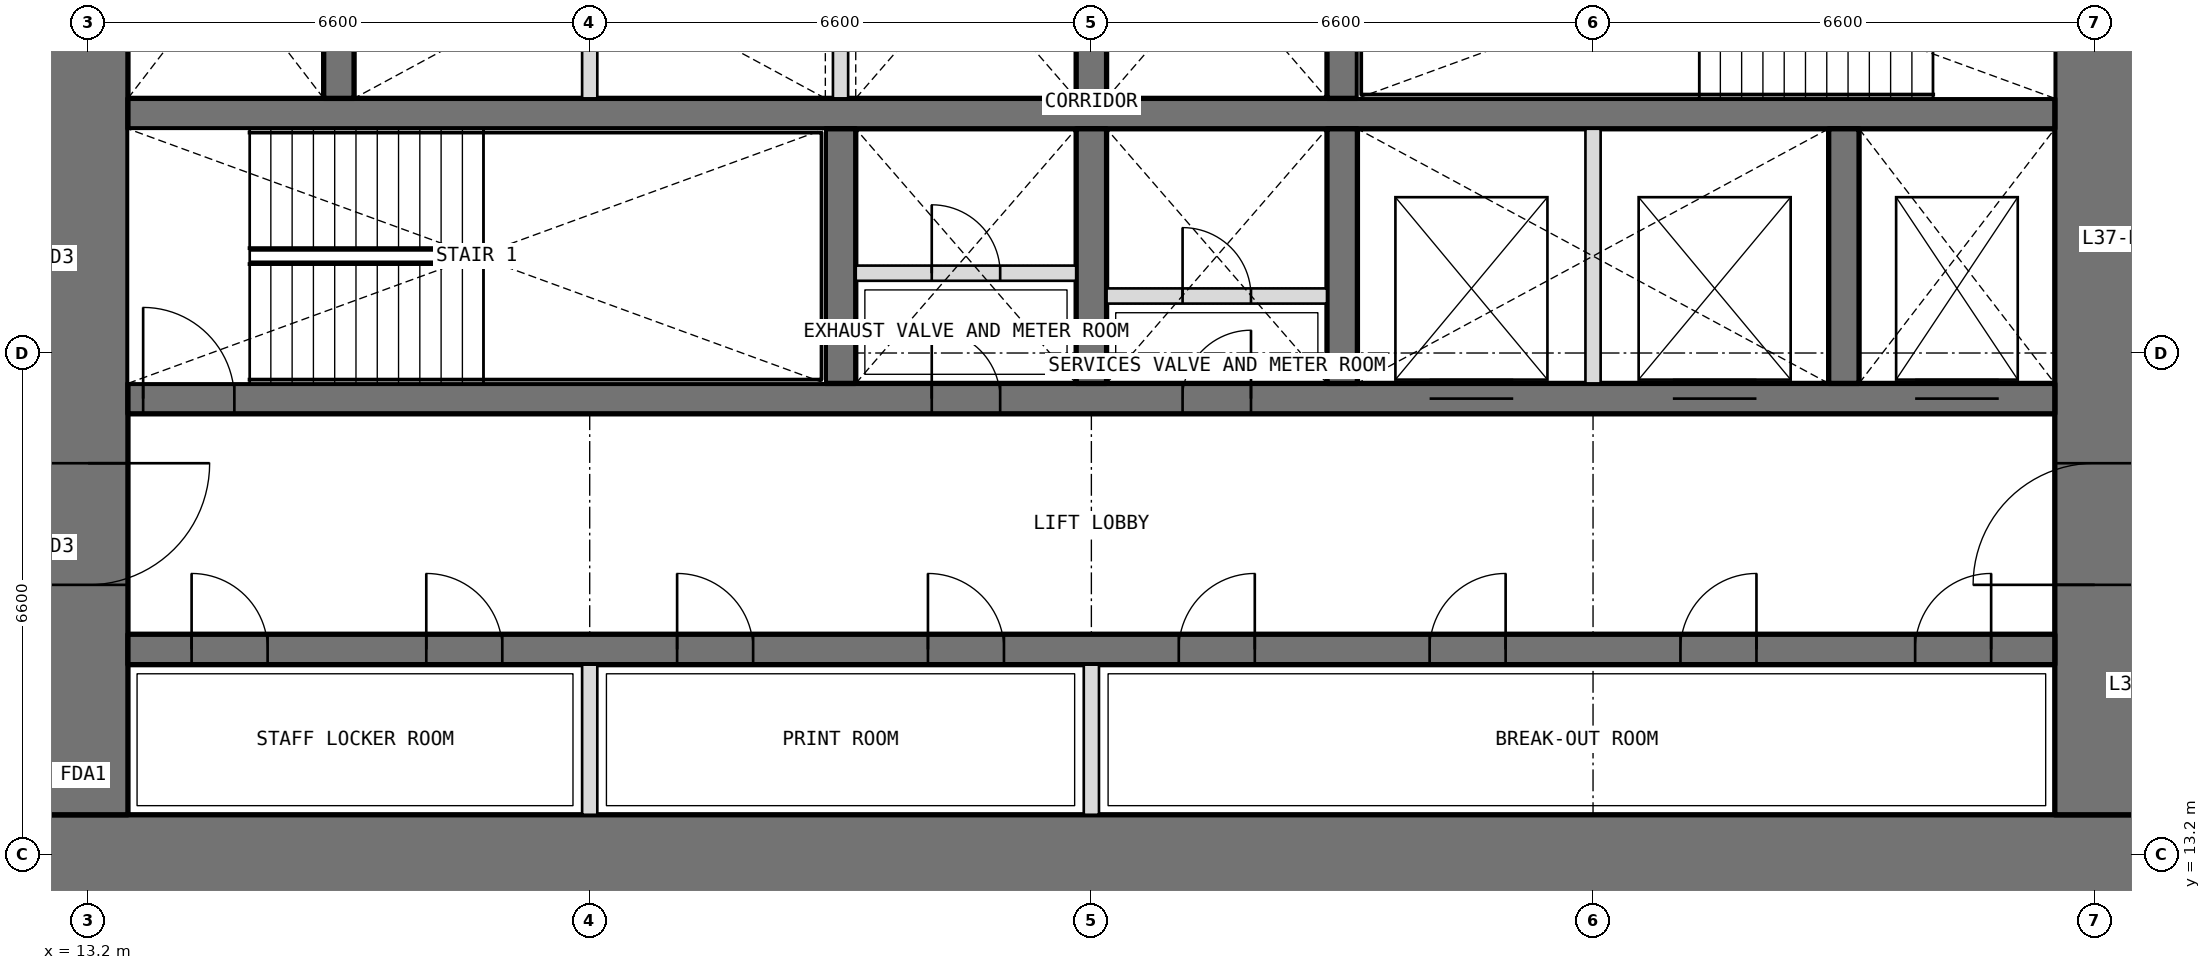
"""IFC4 building model, lengths in metres.
Left out: names, types, materials, properties, quantities, classifications, styles, units other than length and angle.
Written with IfcOpenShell. Run it as: python <this file> out.ifc"""

import sys

from ifc_helpers import new_model, si_unit, direction, frame, frame_2d, origin, place, context, subcontext, project, spatial, rectangle, extrude, element, fill, save


model = new_model("IFC4")
c1 = context("Model", 3, precision=1e-05, world=origin(), true_north=direction((0.0, 1.0)))
c2 = subcontext(c1, "Body", "Model", "MODEL_VIEW")
j1 = project(units=[si_unit("LENGTHUNIT", "METRE"), si_unit("PLANEANGLEUNIT", "RADIAN")], contexts=[c1])
p1 = place(None, origin())
s1 = spatial("IfcSite", under=j1, at=p1, CompositionType="ELEMENT")
p2 = place(p1, origin())
s2 = spatial("IfcBuilding", under=s1, at=p2, CompositionType="ELEMENT")
p3 = place(p2, frame((0.0, 0.0, 164.1)))
s3 = spatial("IfcBuildingStorey", under=s2, at=p3, CompositionType="ELEMENT", Elevation=164.1)
p4 = place(p3, frame((12.675, 13.2, 0.0), z_axis=(0.0, 0.0, 1.0), x_axis=(1.0, 0.0, 0.0)))
e1 = element("IfcWall", 1, at=p4, inside=s3, PredefinedType="SHEAR", context=c2, shape_type="SweptSolid", body=[
    extrude(rectangle(XDim=27.45, YDim=1.05, at=frame_2d((13.725, 0.0))), origin(), (0.0, 0.0, 1.0), 4.2),
])
p5 = place(p3, frame((39.6, 13.725, 0.0), z_axis=(0.0, 0.0, 1.0), x_axis=(0.0, 1.0, 0.0)))
e2 = element("IfcWall", 2, at=p5, inside=s3, PredefinedType="SHEAR", context=c2, shape_type="SweptSolid", body=[
    extrude(rectangle(XDim=18.75, YDim=1.05, at=frame_2d((9.375, 0.0))), origin(), (0.0, 0.0, 1.0), 4.2),
])
p6 = place(p5, frame((3.025, 0.0, 0.0)))
e3 = element("IfcOpeningElement", 3, at=p6, cuts=e2, PredefinedType="OPENING", context=c2, shape_type="SweptSolid", body=[
    extrude(rectangle(XDim=1.6, YDim=2.1, at=frame_2d((0.8, 1.05))), frame((0.0, 0.535, 0.0), z_axis=(0.0, -1.0, 0.0), x_axis=(1.0, 0.0, 0.0)), (0.0, 0.0, 1.0), 1.07),
])
p7 = place(p5, frame((13.825, 0.0, 0.0)))
e4 = element("IfcOpeningElement", 4, at=p7, cuts=e2, PredefinedType="OPENING", context=c2, shape_type="SweptSolid", body=[
    extrude(rectangle(XDim=1.6, YDim=2.1, at=frame_2d((0.8, 1.05))), frame((0.0, 0.535, 0.0), z_axis=(0.0, -1.0, 0.0), x_axis=(1.0, 0.0, 0.0)), (0.0, 0.0, 1.0), 1.07),
])
p8 = place(p3, frame((13.2, 32.475, 0.0), z_axis=(0.0, 0.0, 1.0), x_axis=(0.0, -1.0, 0.0)))
e5 = element("IfcWall", 5, at=p8, inside=s3, PredefinedType="SHEAR", context=c2, shape_type="SweptSolid", body=[
    extrude(rectangle(XDim=18.75, YDim=1.05, at=frame_2d((9.375, 0.0))), origin(), (0.0, 0.0, 1.0), 4.2),
])
p9 = place(p8, frame((14.125, 0.0, 0.0)))
e6 = element("IfcOpeningElement", 6, at=p9, cuts=e5, PredefinedType="OPENING", context=c2, shape_type="SweptSolid", body=[
    extrude(rectangle(XDim=1.6, YDim=2.1, at=frame_2d((0.8, 1.05))), frame((0.0, 0.535, 0.0), z_axis=(0.0, -1.0, 0.0), x_axis=(1.0, 0.0, 0.0)), (0.0, 0.0, 1.0), 1.07),
])
p10 = place(p8, frame((3.325, 0.0, 0.0)))
e7 = element("IfcOpeningElement", 7, at=p10, cuts=e5, PredefinedType="OPENING", context=c2, shape_type="SweptSolid", body=[
    extrude(rectangle(XDim=1.6, YDim=2.1, at=frame_2d((0.8, 1.05))), frame((0.0, 0.535, 0.0), z_axis=(0.0, -1.0, 0.0), x_axis=(1.0, 0.0, 0.0)), (0.0, 0.0, 1.0), 1.07),
])
p11 = place(p3, frame((13.725, 15.9, 0.0), z_axis=(0.0, 0.0, 1.0), x_axis=(1.0, 0.0, 0.0)))
e8 = element("IfcWall", 8, at=p11, inside=s3, PredefinedType="SHEAR", context=c2, shape_type="SweptSolid", body=[
    extrude(rectangle(XDim=25.35, YDim=0.4, at=frame_2d((12.675, 0.0))), origin(), (0.0, 0.0, 1.0), 4.2),
])
p12 = place(p11, frame((0.837, 0.0, 0.0)))
e9 = element("IfcOpeningElement", 9, at=p12, cuts=e8, PredefinedType="OPENING", context=c2, shape_type="SweptSolid", body=[
    extrude(rectangle(XDim=1.0, YDim=2.1, at=frame_2d((0.5, 1.05))), frame((0.0, 0.21, 0.0), z_axis=(0.0, -1.0, 0.0), x_axis=(1.0, 0.0, 0.0)), (0.0, 0.0, 1.0), 0.42),
])
p13 = place(p11, frame((3.925, 0.0, 0.0)))
e10 = element("IfcOpeningElement", 10, at=p13, cuts=e8, PredefinedType="OPENING", context=c2, shape_type="SweptSolid", body=[
    extrude(rectangle(XDim=1.0, YDim=2.1, at=frame_2d((0.5, 1.05))), frame((0.0, 0.21, 0.0), z_axis=(0.0, -1.0, 0.0), x_axis=(1.0, 0.0, 0.0)), (0.0, 0.0, 1.0), 0.42),
])
p14 = place(p11, frame((7.225, 0.0, 0.0)))
e11 = element("IfcOpeningElement", 11, at=p14, cuts=e8, PredefinedType="OPENING", context=c2, shape_type="SweptSolid", body=[
    extrude(rectangle(XDim=1.0, YDim=2.1, at=frame_2d((0.5, 1.05))), frame((0.0, 0.21, 0.0), z_axis=(0.0, -1.0, 0.0), x_axis=(1.0, 0.0, 0.0)), (0.0, 0.0, 1.0), 0.42),
])
p15 = place(p11, frame((10.525, 0.0, 0.0)))
e12 = element("IfcOpeningElement", 12, at=p15, cuts=e8, PredefinedType="OPENING", context=c2, shape_type="SweptSolid", body=[
    extrude(rectangle(XDim=1.0, YDim=2.1, at=frame_2d((0.5, 1.05))), frame((0.0, 0.21, 0.0), z_axis=(0.0, -1.0, 0.0), x_axis=(1.0, 0.0, 0.0)), (0.0, 0.0, 1.0), 0.42),
])
p16 = place(p11, frame((13.825, 0.0, 0.0)))
e13 = element("IfcOpeningElement", 13, at=p16, cuts=e8, PredefinedType="OPENING", context=c2, shape_type="SweptSolid", body=[
    extrude(rectangle(XDim=1.0, YDim=2.1, at=frame_2d((0.5, 1.05))), frame((0.0, 0.21, 0.0), z_axis=(0.0, -1.0, 0.0), x_axis=(1.0, 0.0, 0.0)), (0.0, 0.0, 1.0), 0.42),
])
p17 = place(p11, frame((17.125, 0.0, 0.0)))
e14 = element("IfcOpeningElement", 14, at=p17, cuts=e8, PredefinedType="OPENING", context=c2, shape_type="SweptSolid", body=[
    extrude(rectangle(XDim=1.0, YDim=2.1, at=frame_2d((0.5, 1.05))), frame((0.0, 0.21, 0.0), z_axis=(0.0, -1.0, 0.0), x_axis=(1.0, 0.0, 0.0)), (0.0, 0.0, 1.0), 0.42),
])
p18 = place(p11, frame((20.425, 0.0, 0.0)))
e15 = element("IfcOpeningElement", 15, at=p18, cuts=e8, PredefinedType="OPENING", context=c2, shape_type="SweptSolid", body=[
    extrude(rectangle(XDim=1.0, YDim=2.1, at=frame_2d((0.5, 1.05))), frame((0.0, 0.21, 0.0), z_axis=(0.0, -1.0, 0.0), x_axis=(1.0, 0.0, 0.0)), (0.0, 0.0, 1.0), 0.42),
])
p19 = place(p11, frame((23.512, 0.0, 0.0)))
e16 = element("IfcOpeningElement", 16, at=p19, cuts=e8, PredefinedType="OPENING", context=c2, shape_type="SweptSolid", body=[
    extrude(rectangle(XDim=1.0, YDim=2.1, at=frame_2d((0.5, 1.05))), frame((0.0, 0.21, 0.0), z_axis=(0.0, -1.0, 0.0), x_axis=(1.0, 0.0, 0.0)), (0.0, 0.0, 1.0), 0.42),
])
p20 = place(p3, frame((13.725, 19.2, 0.0), z_axis=(0.0, 0.0, 1.0), x_axis=(1.0, 0.0, 0.0)))
e17 = element("IfcWall", 17, at=p20, inside=s3, PredefinedType="SHEAR", context=c2, shape_type="SweptSolid", body=[
    extrude(rectangle(XDim=25.35, YDim=0.4, at=frame_2d((12.675, 0.0))), origin(), (0.0, 0.0, 1.0), 4.2),
])
p21 = place(p20, frame((10.575, 0.0, 0.0)))
e18 = element("IfcOpeningElement", 18, at=p21, cuts=e17, PredefinedType="OPENING", context=c2, shape_type="SweptSolid", body=[
    extrude(rectangle(XDim=0.9, YDim=2.1, at=frame_2d((0.45, 1.05))), frame((0.0, 0.21, 0.0), z_axis=(0.0, -1.0, 0.0), x_axis=(1.0, 0.0, 0.0)), (0.0, 0.0, 1.0), 0.42),
])
p22 = place(p20, frame((13.875, 0.0, 0.0)))
e19 = element("IfcOpeningElement", 19, at=p22, cuts=e17, PredefinedType="OPENING", context=c2, shape_type="SweptSolid", body=[
    extrude(rectangle(XDim=0.9, YDim=2.1, at=frame_2d((0.45, 1.05))), frame((0.0, 0.21, 0.0), z_axis=(0.0, -1.0, 0.0), x_axis=(1.0, 0.0, 0.0)), (0.0, 0.0, 1.0), 0.42),
])
p23 = place(p20, frame((0.2, 0.0, 0.0)))
e20 = element("IfcOpeningElement", 20, at=p23, cuts=e17, PredefinedType="OPENING", context=c2, shape_type="SweptSolid", body=[
    extrude(rectangle(XDim=1.2, YDim=2.1, at=frame_2d((0.6, 1.05))), frame((0.0, 0.21, 0.0), z_axis=(0.0, -1.0, 0.0), x_axis=(1.0, 0.0, 0.0)), (0.0, 0.0, 1.0), 0.42),
])
p24 = place(p20, frame((23.512, 0.0, 0.0)))
e21 = element("IfcOpeningElement", 21, at=p24, cuts=e17, PredefinedType="OPENING", context=c2, shape_type="SweptSolid", body=[
    extrude(rectangle(XDim=1.1, YDim=2.1, at=frame_2d((0.55, 1.05))), frame((0.0, 0.21, 0.0), z_axis=(0.0, -1.0, 0.0), x_axis=(1.0, 0.0, 0.0)), (0.0, 0.0, 1.0), 0.42),
])
p25 = place(p20, frame((17.125, 0.0, 0.0)))
e22 = element("IfcOpeningElement", 22, at=p25, cuts=e17, PredefinedType="OPENING", context=c2, shape_type="SweptSolid", body=[
    extrude(rectangle(XDim=1.1, YDim=2.1, at=frame_2d((0.55, 1.05))), frame((0.0, 0.21, 0.0), z_axis=(0.0, -1.0, 0.0), x_axis=(1.0, 0.0, 0.0)), (0.0, 0.0, 1.0), 0.42),
])
p26 = place(p20, frame((20.325, 0.0, 0.0)))
e23 = element("IfcOpeningElement", 23, at=p26, cuts=e17, PredefinedType="OPENING", context=c2, shape_type="SweptSolid", body=[
    extrude(rectangle(XDim=1.1, YDim=2.1, at=frame_2d((0.55, 1.05))), frame((0.0, 0.21, 0.0), z_axis=(0.0, -1.0, 0.0), x_axis=(1.0, 0.0, 0.0)), (0.0, 0.0, 1.0), 0.42),
])
p27 = place(p3, frame((13.725, 22.95, 0.0), z_axis=(0.0, 0.0, 1.0), x_axis=(1.0, 0.0, 0.0)))
e24 = element("IfcWall", 24, at=p27, inside=s3, PredefinedType="SHEAR", context=c2, shape_type="SweptSolid", body=[
    extrude(rectangle(XDim=25.35, YDim=0.4, at=frame_2d((12.675, 0.0))), origin(), (0.0, 0.0, 1.0), 4.2),
])
for number, where, z_axis, x_axis in (
    (25, (23.1, 19.4, 0.0), (0.0, 0.0, 1.0), (0.0, 1.0, 0.0)),
    (26, (26.4, 19.4, 0.0), (0.0, 0.0, 1.0), (0.0, 1.0, 0.0)),
    (27, (29.7, 19.4, 0.0), (0.0, 0.0, 1.0), (0.0, 1.0, 0.0)),
    (28, (36.3, 19.4, 0.0), (0.0, 0.0, 1.0), (0.0, 1.0, 0.0)),
    (29, (16.5, 23.15, 0.0), (0.0, 0.0, 1.0), (0.0, 1.0, 0.0)),
    (30, (26.4, 23.15, 0.0), (0.0, 0.0, 1.0), (0.0, 1.0, 0.0)),
    (31, (29.7, 23.15, 0.0), (0.0, 0.0, 1.0), (0.0, 1.0, 0.0)),
):
    element("IfcWall", number, at=place(p3, frame(where, z_axis=z_axis, x_axis=x_axis)), inside=s3, PredefinedType="SHEAR", context=c2, shape_type="SweptSolid", body=[
        extrude(rectangle(XDim=3.35, YDim=0.4, at=frame_2d((1.675, 0.0))), origin(), (0.0, 0.0, 1.0), 4.2),
    ])
for number, where, z_axis, x_axis in (
    (32, (19.8, 13.725, 0.0), (0.0, 0.0, 1.0), (0.0, 1.0, 0.0)),
    (33, (26.4, 13.725, 0.0), (0.0, 0.0, 1.0), (0.0, 1.0, 0.0)),
):
    element("IfcWall", number, at=place(p3, frame(where, z_axis=z_axis, x_axis=x_axis)), inside=s3, PredefinedType="PARTITIONING", context=c2, shape_type="SweptSolid", body=[
        extrude(rectangle(XDim=1.975, YDim=0.2, at=frame_2d((0.987, 0.0))), origin(), (0.0, 0.0, 1.0), 4.2),
    ])
for number, where, z_axis, x_axis in (
    (34, (33.0, 19.4, 0.0), (0.0, 0.0, 1.0), (0.0, 1.0, 0.0)),
    (35, (19.8, 23.15, 0.0), (0.0, 0.0, 1.0), (0.0, 1.0, 0.0)),
    (36, (23.1, 23.15, 0.0), (0.0, 0.0, 1.0), (0.0, 1.0, 0.0)),
):
    element("IfcWall", number, at=place(p3, frame(where, z_axis=z_axis, x_axis=x_axis)), inside=s3, PredefinedType="PARTITIONING", context=c2, shape_type="SweptSolid", body=[
        extrude(rectangle(XDim=3.35, YDim=0.2, at=frame_2d((1.675, 0.0))), origin(), (0.0, 0.0, 1.0), 4.2),
    ])
p28 = place(p3, frame((23.3, 20.85, 0.0), z_axis=(0.0, 0.0, 1.0), x_axis=(1.0, 0.0, 0.0)))
e37 = element("IfcWall", 37, at=p28, inside=s3, PredefinedType="PARTITIONING", context=c2, shape_type="SweptSolid", body=[
    extrude(rectangle(XDim=2.9, YDim=0.2, at=frame_2d((1.45, 0.0))), origin(), (0.0, 0.0, 1.0), 3.9),
])
p29 = place(p28, frame((1.0, 0.0, 0.0)))
e38 = element("IfcOpeningElement", 38, at=p29, cuts=e37, PredefinedType="OPENING", context=c2, shape_type="SweptSolid", body=[
    extrude(rectangle(XDim=0.9, YDim=2.1, at=frame_2d((0.45, 1.05))), frame((0.0, 0.11, 0.0), z_axis=(0.0, -1.0, 0.0), x_axis=(1.0, 0.0, 0.0)), (0.0, 0.0, 1.0), 0.22),
])
p30 = place(p3, frame((26.6, 20.55, 0.0), z_axis=(0.0, 0.0, 1.0), x_axis=(1.0, 0.0, 0.0)))
e39 = element("IfcWall", 39, at=p30, inside=s3, PredefinedType="PARTITIONING", context=c2, shape_type="SweptSolid", body=[
    extrude(rectangle(XDim=2.9, YDim=0.2, at=frame_2d((1.45, 0.0))), origin(), (0.0, 0.0, 1.0), 3.9),
])
p31 = place(p30, frame((1.0, 0.0, 0.0)))
e40 = element("IfcOpeningElement", 40, at=p31, cuts=e39, PredefinedType="OPENING", context=c2, shape_type="SweptSolid", body=[
    extrude(rectangle(XDim=0.9, YDim=2.1, at=frame_2d((0.45, 1.05))), frame((0.0, 0.11, 0.0), z_axis=(0.0, -1.0, 0.0), x_axis=(1.0, 0.0, 0.0)), (0.0, 0.0, 1.0), 0.22),
])
p32 = place(p21, origin())
e41 = element("IfcDoor", 41, at=p32, inside=s3, OperationType="SINGLE_SWING_LEFT", PredefinedType="DOOR", context=c2, shape_type="SweptSolid", body=[
    extrude(rectangle(XDim=0.9, YDim=2.1, at=frame_2d((0.45, 1.05))), frame((0.0, 0.025, 0.0), z_axis=(0.0, -1.0, 0.0), x_axis=(1.0, 0.0, 0.0)), (0.0, 0.0, 1.0), 0.05),
])
fill(e18, e41)
p33 = place(p29, origin())
e42 = element("IfcDoor", 42, at=p33, inside=s3, OperationType="SINGLE_SWING_LEFT", PredefinedType="DOOR", context=c2, shape_type="SweptSolid", body=[
    extrude(rectangle(XDim=0.9, YDim=2.1, at=frame_2d((0.45, 1.05))), frame((0.0, 0.025, 0.0), z_axis=(0.0, -1.0, 0.0), x_axis=(1.0, 0.0, 0.0)), (0.0, 0.0, 1.0), 0.05),
])
fill(e38, e42)
p34 = place(p22, origin())
e43 = element("IfcDoor", 43, at=p34, inside=s3, OperationType="SINGLE_SWING_RIGHT", PredefinedType="DOOR", context=c2, shape_type="SweptSolid", body=[
    extrude(rectangle(XDim=0.9, YDim=2.1, at=frame_2d((0.45, 1.05))), frame((0.0, 0.025, 0.0), z_axis=(0.0, -1.0, 0.0), x_axis=(1.0, 0.0, 0.0)), (0.0, 0.0, 1.0), 0.05),
])
fill(e19, e43)
p35 = place(p31, origin())
e44 = element("IfcDoor", 44, at=p35, inside=s3, OperationType="SINGLE_SWING_LEFT", PredefinedType="DOOR", context=c2, shape_type="SweptSolid", body=[
    extrude(rectangle(XDim=0.9, YDim=2.1, at=frame_2d((0.45, 1.05))), frame((0.0, 0.025, 0.0), z_axis=(0.0, -1.0, 0.0), x_axis=(1.0, 0.0, 0.0)), (0.0, 0.0, 1.0), 0.05),
])
fill(e40, e44)
p36 = place(p12, origin())
e45 = element("IfcDoor", 45, at=p36, inside=s3, OperationType="SINGLE_SWING_LEFT", PredefinedType="DOOR", context=c2, shape_type="SweptSolid", body=[
    extrude(rectangle(XDim=1.0, YDim=2.1, at=frame_2d((0.5, 1.05))), frame((0.0, 0.025, 0.0), z_axis=(0.0, -1.0, 0.0), x_axis=(1.0, 0.0, 0.0)), (0.0, 0.0, 1.0), 0.05),
])
fill(e9, e45)
p37 = place(p13, origin())
e46 = element("IfcDoor", 46, at=p37, inside=s3, OperationType="SINGLE_SWING_LEFT", PredefinedType="DOOR", context=c2, shape_type="SweptSolid", body=[
    extrude(rectangle(XDim=1.0, YDim=2.1, at=frame_2d((0.5, 1.05))), frame((0.0, 0.025, 0.0), z_axis=(0.0, -1.0, 0.0), x_axis=(1.0, 0.0, 0.0)), (0.0, 0.0, 1.0), 0.05),
])
fill(e10, e46)
p38 = place(p14, origin())
e47 = element("IfcDoor", 47, at=p38, inside=s3, OperationType="SINGLE_SWING_LEFT", PredefinedType="DOOR", context=c2, shape_type="SweptSolid", body=[
    extrude(rectangle(XDim=1.0, YDim=2.1, at=frame_2d((0.5, 1.05))), frame((0.0, 0.025, 0.0), z_axis=(0.0, -1.0, 0.0), x_axis=(1.0, 0.0, 0.0)), (0.0, 0.0, 1.0), 0.05),
])
fill(e11, e47)
p39 = place(p15, origin())
e48 = element("IfcDoor", 48, at=p39, inside=s3, OperationType="SINGLE_SWING_LEFT", PredefinedType="DOOR", context=c2, shape_type="SweptSolid", body=[
    extrude(rectangle(XDim=1.0, YDim=2.1, at=frame_2d((0.5, 1.05))), frame((0.0, 0.025, 0.0), z_axis=(0.0, -1.0, 0.0), x_axis=(1.0, 0.0, 0.0)), (0.0, 0.0, 1.0), 0.05),
])
fill(e12, e48)
p40 = place(p16, origin())
e49 = element("IfcDoor", 49, at=p40, inside=s3, OperationType="SINGLE_SWING_RIGHT", PredefinedType="DOOR", context=c2, shape_type="SweptSolid", body=[
    extrude(rectangle(XDim=1.0, YDim=2.1, at=frame_2d((0.5, 1.05))), frame((0.0, 0.025, 0.0), z_axis=(0.0, -1.0, 0.0), x_axis=(1.0, 0.0, 0.0)), (0.0, 0.0, 1.0), 0.05),
])
fill(e13, e49)
p41 = place(p17, origin())
e50 = element("IfcDoor", 50, at=p41, inside=s3, OperationType="SINGLE_SWING_RIGHT", PredefinedType="DOOR", context=c2, shape_type="SweptSolid", body=[
    extrude(rectangle(XDim=1.0, YDim=2.1, at=frame_2d((0.5, 1.05))), frame((0.0, 0.025, 0.0), z_axis=(0.0, -1.0, 0.0), x_axis=(1.0, 0.0, 0.0)), (0.0, 0.0, 1.0), 0.05),
])
fill(e14, e50)
p42 = place(p18, origin())
e51 = element("IfcDoor", 51, at=p42, inside=s3, OperationType="SINGLE_SWING_RIGHT", PredefinedType="DOOR", context=c2, shape_type="SweptSolid", body=[
    extrude(rectangle(XDim=1.0, YDim=2.1, at=frame_2d((0.5, 1.05))), frame((0.0, 0.025, 0.0), z_axis=(0.0, -1.0, 0.0), x_axis=(1.0, 0.0, 0.0)), (0.0, 0.0, 1.0), 0.05),
])
fill(e15, e51)
p43 = place(p19, origin())
e52 = element("IfcDoor", 52, at=p43, inside=s3, OperationType="SINGLE_SWING_RIGHT", PredefinedType="DOOR", context=c2, shape_type="SweptSolid", body=[
    extrude(rectangle(XDim=1.0, YDim=2.1, at=frame_2d((0.5, 1.05))), frame((0.0, 0.025, 0.0), z_axis=(0.0, -1.0, 0.0), x_axis=(1.0, 0.0, 0.0)), (0.0, 0.0, 1.0), 0.05),
])
fill(e16, e52)
p44 = place(p23, origin())
e53 = element("IfcDoor", 53, at=p44, inside=s3, OperationType="SINGLE_SWING_LEFT", PredefinedType="DOOR", context=c2, shape_type="SweptSolid", body=[
    extrude(rectangle(XDim=1.2, YDim=2.1, at=frame_2d((0.6, 1.05))), frame((0.0, 0.025, 0.0), z_axis=(0.0, -1.0, 0.0), x_axis=(1.0, 0.0, 0.0)), (0.0, 0.0, 1.0), 0.05),
])
fill(e20, e53)
p45 = place(p9, origin())
e54 = element("IfcDoor", 54, at=p45, inside=s3, OperationType="DOUBLE_DOOR_DOUBLE_SWING", PredefinedType="DOOR", context=c2, shape_type="SweptSolid", body=[
    extrude(rectangle(XDim=1.6, YDim=2.1, at=frame_2d((0.8, 1.05))), frame((0.0, 0.025, 0.0), z_axis=(0.0, -1.0, 0.0), x_axis=(1.0, 0.0, 0.0)), (0.0, 0.0, 1.0), 0.05),
])
fill(e6, e54)
p46 = place(p6, origin())
e55 = element("IfcDoor", 55, at=p46, inside=s3, OperationType="DOUBLE_DOOR_DOUBLE_SWING", PredefinedType="DOOR", context=c2, shape_type="SweptSolid", body=[
    extrude(rectangle(XDim=1.6, YDim=2.1, at=frame_2d((0.8, 1.05))), frame((0.0, 0.025, 0.0), z_axis=(0.0, -1.0, 0.0), x_axis=(1.0, 0.0, 0.0)), (0.0, 0.0, 1.0), 0.05),
])
fill(e3, e55)
p47 = place(p24, origin())
e56 = element("IfcDoor", 56, at=p47, inside=s3, OperationType="DOUBLE_DOOR_SLIDING", PredefinedType="DOOR", context=c2, shape_type="SweptSolid", body=[
    extrude(rectangle(XDim=1.1, YDim=2.1, at=frame_2d((0.55, 1.05))), frame((0.0, 0.025, 0.0), z_axis=(0.0, -1.0, 0.0), x_axis=(1.0, 0.0, 0.0)), (0.0, 0.0, 1.0), 0.05),
])
fill(e21, e56)
p48 = place(p25, origin())
e57 = element("IfcDoor", 57, at=p48, inside=s3, OperationType="DOUBLE_DOOR_SLIDING", PredefinedType="DOOR", context=c2, shape_type="SweptSolid", body=[
    extrude(rectangle(XDim=1.1, YDim=2.1, at=frame_2d((0.55, 1.05))), frame((0.0, 0.025, 0.0), z_axis=(0.0, -1.0, 0.0), x_axis=(1.0, 0.0, 0.0)), (0.0, 0.0, 1.0), 0.05),
])
fill(e22, e57)
p49 = place(p26, origin())
e58 = element("IfcDoor", 58, at=p49, inside=s3, OperationType="DOUBLE_DOOR_SLIDING", PredefinedType="DOOR", context=c2, shape_type="SweptSolid", body=[
    extrude(rectangle(XDim=1.1, YDim=2.1, at=frame_2d((0.55, 1.05))), frame((0.0, 0.025, 0.0), z_axis=(0.0, -1.0, 0.0), x_axis=(1.0, 0.0, 0.0)), (0.0, 0.0, 1.0), 0.05),
])
fill(e23, e58)
save(model, sys.argv[1])
